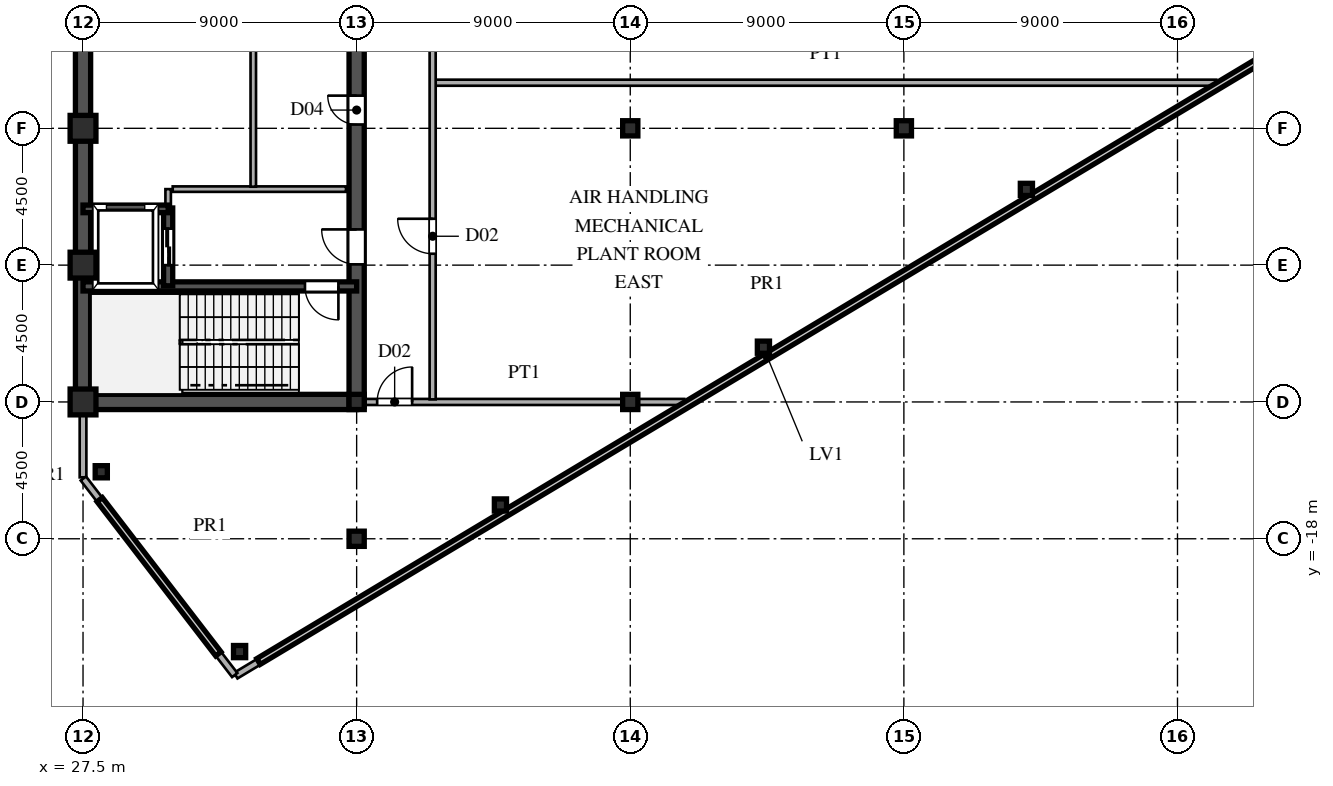
"""IFC4 building model, lengths in metres.
Left out: names, types, materials, properties, quantities, classifications, styles, units other than length and angle.
Written with IfcOpenShell. Run it as: python <this file> out.ifc"""

import sys

from ifc_helpers import new_model, si_unit, direction, frame, frame_2d, origin, origin_2d, place, context, subcontext, project, spatial, rectangle, hollow_rectangle, i_section, extrude, source, transform, mapped, element, fill, save


model = new_model("IFC4")
c1 = context("Model", 3, precision=1e-05, world=origin(), true_north=direction((0.0, 1.0)))
c2 = subcontext(c1, "Body", "Model", "MODEL_VIEW")
j1 = project(units=[si_unit("LENGTHUNIT", "METRE"), si_unit("PLANEANGLEUNIT", "RADIAN")], contexts=[c1])
p1 = place(None, origin())
s1 = spatial("IfcSite", under=j1, at=p1, CompositionType="ELEMENT")
p2 = place(p1, origin())
s2 = spatial("IfcBuilding", under=s1, at=p2, CompositionType="ELEMENT")
p3 = place(p2, frame((0.0, 0.0, 224.7)))
s3 = spatial("IfcBuildingStorey", under=s2, at=p3, CompositionType="ELEMENT", Elevation=224.7)
m1 = source(origin(), c2, "Body", "SweptSolid", [
    extrude(hollow_rectangle(XDim=0.85, YDim=0.85, WallThickness=0.036, at=origin_2d()), origin(), (0.0, 0.0, 1.0), 5.1),
])
for number, where, z_axis, x_axis in (
    (1, (27.5, -13.5, 0.0), (0.0, 0.0, 1.0), (1.0, 0.0, 0.0)),
    (2, (27.5, -9.0, 0.0), (0.0, 0.0, 1.0), (1.0, 0.0, 0.0)),
    (3, (27.5, -4.5, 0.0), (0.0, 0.0, 1.0), (1.0, 0.0, 0.0)),
):
    element("IfcColumn", number, at=place(p3, frame(where, z_axis=z_axis, x_axis=x_axis)), inside=s3, PredefinedType="COLUMN", context=c2, shape_type="MappedRepresentation", body=[
        mapped(m1, transform((0.0, 0.0, 0.0), scale=1.0)),
    ])
m2 = source(origin(), c2, "Body", "SweptSolid", [
    extrude(i_section(OverallWidth=0.5, OverallDepth=0.5, WebThickness=0.02, FlangeThickness=0.032, at=origin_2d()), origin(), (0.0, 0.0, 1.0), 5.1),
])
for number, where, z_axis, x_axis in (
    (4, (36.5, -18.0, 0.0), (0.0, 0.0, 1.0), (1.0, 0.0, 0.0)),
    (5, (36.5, -13.5, 0.0), (0.0, 0.0, 1.0), (1.0, 0.0, 0.0)),
    (6, (45.5, -13.5, 0.0), (0.0, 0.0, 1.0), (1.0, 0.0, 0.0)),
    (7, (45.5, -4.5, 0.0), (0.0, 0.0, 1.0), (1.0, 0.0, 0.0)),
    (8, (54.5, -4.5, 0.0), (0.0, 0.0, 1.0), (1.0, 0.0, 0.0)),
):
    element("IfcColumn", number, at=place(p3, frame(where, z_axis=z_axis, x_axis=x_axis)), inside=s3, PredefinedType="COLUMN", context=c2, shape_type="MappedRepresentation", body=[
        mapped(m2, transform((0.0, 0.0, 0.0), scale=1.0)),
    ])
m3 = source(origin(), c2, "Body", "SweptSolid", [
    extrude(hollow_rectangle(XDim=0.4, YDim=0.4, WallThickness=0.016, at=origin_2d()), origin(), (0.0, 0.0, 1.0), 5.1),
])
for number, where, z_axis, x_axis in (
    (9, (32.65, -21.71, 0.0), (0.0, 0.0, 1.0), (1.0, 0.0, 0.0)),
    (10, (28.1, -15.796, 0.0), (0.0, 0.0, 1.0), (1.0, 0.0, 0.0)),
    (11, (41.23, -16.889, 0.0), (0.0, 0.0, 1.0), (1.0, 0.0, 0.0)),
    (12, (49.88, -11.699, 0.0), (0.0, 0.0, 1.0), (1.0, 0.0, 0.0)),
    (13, (58.53, -6.509, 0.0), (0.0, 0.0, 1.0), (1.0, 0.0, 0.0)),
):
    element("IfcColumn", number, at=place(p3, frame(where, z_axis=z_axis, x_axis=x_axis)), inside=s3, PredefinedType="COLUMN", context=c2, shape_type="MappedRepresentation", body=[
        mapped(m3, transform((0.0, 0.0, 0.0), scale=1.0)),
    ])
p4 = place(p3, frame((32.517, -22.49, 0.0), z_axis=(0.0, 0.0, 1.0), x_axis=(0.857492925713, 0.514495755428, 0.0)))
e14 = element("IfcWall", 14, at=p4, inside=s3, PredefinedType="PARAPET", context=c2, shape_type="SweptSolid", body=[
    extrude(rectangle(XDim=40.777, YDim=0.22, at=frame_2d((20.388, 0.0))), origin(), (0.0, 0.0, 1.0), 1.25),
])
p5 = place(p3, frame((27.5, -15.98, 0.0), z_axis=(0.0, 0.0, 1.0), x_axis=(0.0, 1.0, 0.0)))
e15 = element("IfcWall", 15, at=p5, inside=s3, PredefinedType="PARAPET", context=c2, shape_type="SweptSolid", body=[
    extrude(rectangle(XDim=2.46, YDim=0.22, at=frame_2d((1.23, 0.0))), origin(), (0.0, 0.0, 1.0), 1.25),
])
p6 = place(p3, frame((27.512, -16.016, 0.0), z_axis=(0.0, 0.0, 1.0), x_axis=(0.60971076085, -0.792623989105, 0.0)))
e16 = element("IfcWall", 16, at=p6, inside=s3, PredefinedType="PARAPET", context=c2, shape_type="SweptSolid", body=[
    extrude(rectangle(XDim=8.161, YDim=0.22, at=frame_2d((4.08, 0.0))), origin(), (0.0, 0.0, 1.0), 1.25),
])
p7 = place(p3, frame((27.5, -13.5, 0.0), z_axis=(0.0, 0.0, 1.0), x_axis=(0.0, 1.0, 0.0)))
e17 = element("IfcWall", 17, at=p7, inside=s3, PredefinedType="SHEAR", context=c2, shape_type="SweptSolid", body=[
    extrude(rectangle(XDim=12.2, YDim=0.5, at=frame_2d((6.1, 0.0))), origin(), (0.0, 0.0, 1.0), 4.84),
])
p8 = place(p3, frame((27.5, -13.5, 0.0), z_axis=(0.0, 0.0, 1.0), x_axis=(1.0, 0.0, 0.0)))
e18 = element("IfcWall", 18, at=p8, inside=s3, PredefinedType="SHEAR", context=c2, shape_type="SweptSolid", body=[
    extrude(rectangle(XDim=9.0, YDim=0.5, at=frame_2d((4.5, 0.0))), origin(), (0.0, 0.0, 1.0), 4.84),
])
p9 = place(p3, frame((36.5, -13.65, 0.0), z_axis=(0.0, 0.0, 1.0), x_axis=(0.0, 1.0, 0.0)))
e19 = element("IfcWall", 19, at=p9, inside=s3, PredefinedType="SHEAR", context=c2, shape_type="SweptSolid", body=[
    extrude(rectangle(XDim=7.15, YDim=0.5, at=frame_2d((3.575, 0.0))), origin(), (0.0, 0.0, 1.0), 4.84),
])
p10 = place(p9, frame((4.675, 0.0, 0.0)))
e20 = element("IfcOpeningElement", 20, at=p10, cuts=e19, PredefinedType="OPENING", context=c2, shape_type="SweptSolid", body=[
    extrude(rectangle(XDim=1.15, YDim=2.2, at=frame_2d((0.575, 1.1))), frame((0.0, 0.26, 0.0), z_axis=(0.0, -1.0, 0.0), x_axis=(1.0, 0.0, 0.0)), (0.0, 0.0, 1.0), 0.52),
])
p11 = place(p3, frame((36.5, -6.5, 0.0), z_axis=(0.0, 0.0, 1.0), x_axis=(0.0, 1.0, 0.0)))
e21 = element("IfcWall", 21, at=p11, inside=s3, PredefinedType="SHEAR", context=c2, shape_type="SweptSolid", body=[
    extrude(rectangle(XDim=5.2, YDim=0.5, at=frame_2d((2.6, 0.0))), origin(), (0.0, 0.0, 1.0), 4.84),
])
p12 = place(p11, frame((2.125, 0.0, 0.0)))
e22 = element("IfcOpeningElement", 22, at=p12, cuts=e21, PredefinedType="OPENING", context=c2, shape_type="SweptSolid", body=[
    extrude(rectangle(XDim=0.95, YDim=2.15, at=frame_2d((0.475, 1.075))), frame((0.0, 0.26, 0.0), z_axis=(0.0, -1.0, 0.0), x_axis=(1.0, 0.0, 0.0)), (0.0, 0.0, 1.0), 0.52),
])
p13 = place(p3, frame((27.5, -9.7, 0.0), z_axis=(0.0, 0.0, 1.0), x_axis=(1.0, 0.0, 0.0)))
e23 = element("IfcWall", 23, at=p13, inside=s3, PredefinedType="SHEAR", context=c2, shape_type="SweptSolid", body=[
    extrude(rectangle(XDim=9.0, YDim=0.3, at=frame_2d((4.5, 0.0))), origin(), (0.0, 0.0, 1.0), 4.84),
])
p14 = place(p13, frame((7.3, 0.0, 0.0)))
e24 = element("IfcOpeningElement", 24, at=p14, cuts=e23, PredefinedType="OPENING", context=c2, shape_type="SweptSolid", body=[
    extrude(rectangle(XDim=1.1, YDim=2.2, at=frame_2d((0.55, 1.1))), frame((0.0, 0.16, 0.0), z_axis=(0.0, -1.0, 0.0), x_axis=(1.0, 0.0, 0.0)), (0.0, 0.0, 1.0), 0.32),
])
p15 = place(p3, frame((27.5, -7.15, 0.0), z_axis=(0.0, 0.0, 1.0), x_axis=(1.0, 0.0, 0.0)))
e25 = element("IfcWall", 25, at=p15, inside=s3, PredefinedType="SHEAR", context=c2, shape_type="SweptSolid", body=[
    extrude(rectangle(XDim=2.8, YDim=0.25, at=frame_2d((1.4, 0.0))), origin(), (0.0, 0.0, 1.0), 4.84),
])
p16 = place(p3, frame((30.3, -9.68, 0.0), z_axis=(0.0, 0.0, 1.0), x_axis=(0.0, 1.0, 0.0)))
e26 = element("IfcWall", 26, at=p16, inside=s3, PredefinedType="SHEAR", context=c2, shape_type="SweptSolid", body=[
    extrude(rectangle(XDim=2.56, YDim=0.3, at=frame_2d((1.28, 0.0))), origin(), (0.0, 0.0, 1.0), 4.84),
])
p17 = place(p16, frame((0.68, 0.0, 0.0)))
e27 = element("IfcOpeningElement", 27, at=p17, cuts=e26, PredefinedType="OPENING", context=c2, shape_type="SweptSolid", body=[
    extrude(rectangle(XDim=1.2, YDim=2.25, at=frame_2d((0.6, 1.125))), frame((0.0, 0.16, 0.0), z_axis=(0.0, -1.0, 0.0), x_axis=(1.0, 0.0, 0.0)), (0.0, 0.0, 1.0), 0.32),
])
p18 = place(p3, frame((30.45, -6.5, 0.0), z_axis=(0.0, 0.0, 1.0), x_axis=(1.0, 0.0, 0.0)))
e28 = element("IfcWall", 28, at=p18, inside=s3, PredefinedType="PARTITIONING", context=c2, shape_type="SweptSolid", body=[
    extrude(rectangle(XDim=5.7, YDim=0.18, at=frame_2d((2.85, 0.0))), origin(), (0.0, 0.0, 1.0), 4.84),
])
p19 = place(p3, frame((30.3, -7.12, 0.0), z_axis=(0.0, 0.0, 1.0), x_axis=(0.0, 1.0, 0.0)))
e29 = element("IfcWall", 29, at=p19, inside=s3, PredefinedType="PARTITIONING", context=c2, shape_type="SweptSolid", body=[
    extrude(rectangle(XDim=0.62, YDim=0.18, at=frame_2d((0.31, 0.0))), origin(), (0.0, 0.0, 1.0), 4.84),
])
p20 = place(p3, frame((33.1, -6.42, 0.0), z_axis=(0.0, 0.0, 1.0), x_axis=(0.0, 1.0, 0.0)))
e30 = element("IfcWall", 30, at=p20, inside=s3, PredefinedType="PARTITIONING", context=c2, shape_type="SweptSolid", body=[
    extrude(rectangle(XDim=5.04, YDim=0.18, at=frame_2d((2.52, 0.0))), origin(), (0.0, 0.0, 1.0), 4.84),
])
p21 = place(p3, frame((36.755, -13.5, 0.0), z_axis=(0.0, 0.0, 1.0), x_axis=(1.0, 0.0, 0.0)))
e31 = element("IfcWall", 31, at=p21, inside=s3, PredefinedType="PARTITIONING", context=c2, shape_type="SweptSolid", body=[
    extrude(rectangle(XDim=8.765, YDim=0.2, at=frame_2d((4.383, 0.0))), origin(), (0.0, 0.0, 1.0), 4.24),
])
p22 = place(p21, frame((0.42, 0.0, 0.0)))
e32 = element("IfcOpeningElement", 32, at=p22, cuts=e31, PredefinedType="OPENING", context=c2, shape_type="SweptSolid", body=[
    extrude(rectangle(XDim=1.15, YDim=2.2, at=frame_2d((0.575, 1.1))), frame((0.0, 0.11, 0.0), z_axis=(0.0, -1.0, 0.0), x_axis=(1.0, 0.0, 0.0)), (0.0, 0.0, 1.0), 0.22),
])
p23 = place(p3, frame((45.52, -13.5, 0.0), z_axis=(0.0, 0.0, 1.0), x_axis=(1.0, 0.0, 0.0)))
e33 = element("IfcWall", 33, at=p23, inside=s3, PredefinedType="PARTITIONING", context=c2, shape_type="SweptSolid", body=[
    extrude(rectangle(XDim=1.757, YDim=0.2, at=frame_2d((0.878, 0.0))), origin(), (0.0, 0.0, 1.0), 4.84),
])
p24 = place(p3, frame((39.085, -3.0, 0.0), z_axis=(0.0, 0.0, 1.0), x_axis=(1.0, 0.0, 0.0)))
e34 = element("IfcWall", 34, at=p24, inside=s3, PredefinedType="PARTITIONING", context=c2, shape_type="SweptSolid", body=[
    extrude(rectangle(XDim=25.692, YDim=0.2, at=frame_2d((12.846, 0.0))), origin(), (0.0, 0.0, 1.0), 4.84),
])
p25 = place(p3, frame((39.0, -13.415, 0.0), z_axis=(0.0, 0.0, 1.0), x_axis=(0.0, 1.0, 0.0)))
e35 = element("IfcWall", 35, at=p25, inside=s3, PredefinedType="PARTITIONING", context=c2, shape_type="SweptSolid", body=[
    extrude(rectangle(XDim=26.83, YDim=0.2, at=frame_2d((13.415, 0.0))), origin(), (0.0, 0.0, 1.0), 4.84),
])
p26 = place(p25, frame((4.79, 0.0, 0.0)))
e36 = element("IfcOpeningElement", 36, at=p26, cuts=e35, PredefinedType="OPENING", context=c2, shape_type="SweptSolid", body=[
    extrude(rectangle(XDim=1.15, YDim=2.2, at=frame_2d((0.575, 1.1))), frame((0.0, 0.11, 0.0), z_axis=(0.0, -1.0, 0.0), x_axis=(1.0, 0.0, 0.0)), (0.0, 0.0, 1.0), 0.22),
])
p27 = place(p25, frame((12.84, 0.0, 0.0)))
e37 = element("IfcOpeningElement", 37, at=p27, cuts=e35, PredefinedType="OPENING", context=c2, shape_type="SweptSolid", body=[
    extrude(rectangle(XDim=1.15, YDim=2.2, at=frame_2d((0.575, 1.1))), frame((0.0, 0.11, 0.0), z_axis=(0.0, -1.0, 0.0), x_axis=(1.0, 0.0, 0.0)), (0.0, 0.0, 1.0), 0.22),
])
p28 = place(p25, frame((18.59, 0.0, 0.0)))
e38 = element("IfcOpeningElement", 38, at=p28, cuts=e35, PredefinedType="OPENING", context=c2, shape_type="SweptSolid", body=[
    extrude(rectangle(XDim=1.15, YDim=2.2, at=frame_2d((0.575, 1.1))), frame((0.0, 0.11, 0.0), z_axis=(0.0, -1.0, 0.0), x_axis=(1.0, 0.0, 0.0)), (0.0, 0.0, 1.0), 0.22),
])
p29 = place(p25, frame((23.64, 0.0, 0.0)))
e39 = element("IfcOpeningElement", 39, at=p29, cuts=e35, PredefinedType="OPENING", context=c2, shape_type="SweptSolid", body=[
    extrude(rectangle(XDim=1.15, YDim=2.2, at=frame_2d((0.575, 1.1))), frame((0.0, 0.11, 0.0), z_axis=(0.0, -1.0, 0.0), x_axis=(1.0, 0.0, 0.0)), (0.0, 0.0, 1.0), 0.22),
])
m4 = source(origin(), c2, "Body", "SweptSolid", [
    extrude(rectangle(XDim=1.15, YDim=2.2, at=frame_2d((0.575, 1.1))), frame((0.0, 0.025, 0.0), z_axis=(0.0, -1.0, 0.0), x_axis=(1.0, 0.0, 0.0)), (0.0, 0.0, 1.0), 0.05),
])
p30 = place(p10, origin())
e40 = element("IfcDoor", 40, at=p30, inside=s3, OperationType="SINGLE_SWING_RIGHT", PredefinedType="DOOR", context=c2, shape_type="MappedRepresentation", body=[
    mapped(m4, transform((0.0, 0.0, 0.0), scale=1.0)),
])
fill(e20, e40)
m5 = source(origin(), c2, "Body", "SweptSolid", [
    extrude(rectangle(XDim=0.95, YDim=2.15, at=frame_2d((0.475, 1.075))), frame((0.0, 0.025, 0.0), z_axis=(0.0, -1.0, 0.0), x_axis=(1.0, 0.0, 0.0)), (0.0, 0.0, 1.0), 0.05),
])
p31 = place(p12, origin())
e41 = element("IfcDoor", 41, at=p31, inside=s3, OperationType="SINGLE_SWING_RIGHT", PredefinedType="DOOR", context=c2, shape_type="MappedRepresentation", body=[
    mapped(m5, transform((0.0, 0.0, 0.0), scale=1.0)),
])
fill(e22, e41)
m6 = source(origin(), c2, "Body", "SweptSolid", [
    extrude(rectangle(XDim=1.1, YDim=2.2, at=frame_2d((0.55, 1.1))), frame((0.0, 0.025, 0.0), z_axis=(0.0, -1.0, 0.0), x_axis=(1.0, 0.0, 0.0)), (0.0, 0.0, 1.0), 0.05),
])
p32 = place(p14, frame((1.1, 0.0, 0.0), z_axis=(0.0, 0.0, 1.0), x_axis=(-1.0, 0.0, 0.0)))
e42 = element("IfcDoor", 42, at=p32, inside=s3, OperationType="SINGLE_SWING_RIGHT", PredefinedType="DOOR", context=c2, shape_type="MappedRepresentation", body=[
    mapped(m6, transform((0.0, 0.0, 0.0), scale=1.0)),
])
fill(e24, e42)
m7 = source(origin(), c2, "Body", "SweptSolid", [
    extrude(rectangle(XDim=1.2, YDim=2.25, at=frame_2d((0.6, 1.125))), frame((0.0, 0.025, 0.0), z_axis=(0.0, -1.0, 0.0), x_axis=(1.0, 0.0, 0.0)), (0.0, 0.0, 1.0), 0.05),
])
p33 = place(p17, origin())
e43 = element("IfcDoor", 43, at=p33, inside=s3, OperationType="DOUBLE_DOOR_SLIDING", PredefinedType="DOOR", context=c2, shape_type="MappedRepresentation", body=[
    mapped(m7, transform((0.0, 0.0, 0.0), scale=1.0)),
])
fill(e27, e43)
p34 = place(p22, origin())
e44 = element("IfcDoor", 44, at=p34, inside=s3, OperationType="SINGLE_SWING_RIGHT", PredefinedType="DOOR", context=c2, shape_type="MappedRepresentation", body=[
    mapped(m4, transform((0.0, 0.0, 0.0), scale=1.0)),
])
fill(e32, e44)
p35 = place(p26, origin())
e45 = element("IfcDoor", 45, at=p35, inside=s3, OperationType="SINGLE_SWING_RIGHT", PredefinedType="DOOR", context=c2, shape_type="MappedRepresentation", body=[
    mapped(m4, transform((0.0, 0.0, 0.0), scale=1.0)),
])
fill(e36, e45)
save(model, sys.argv[1])
